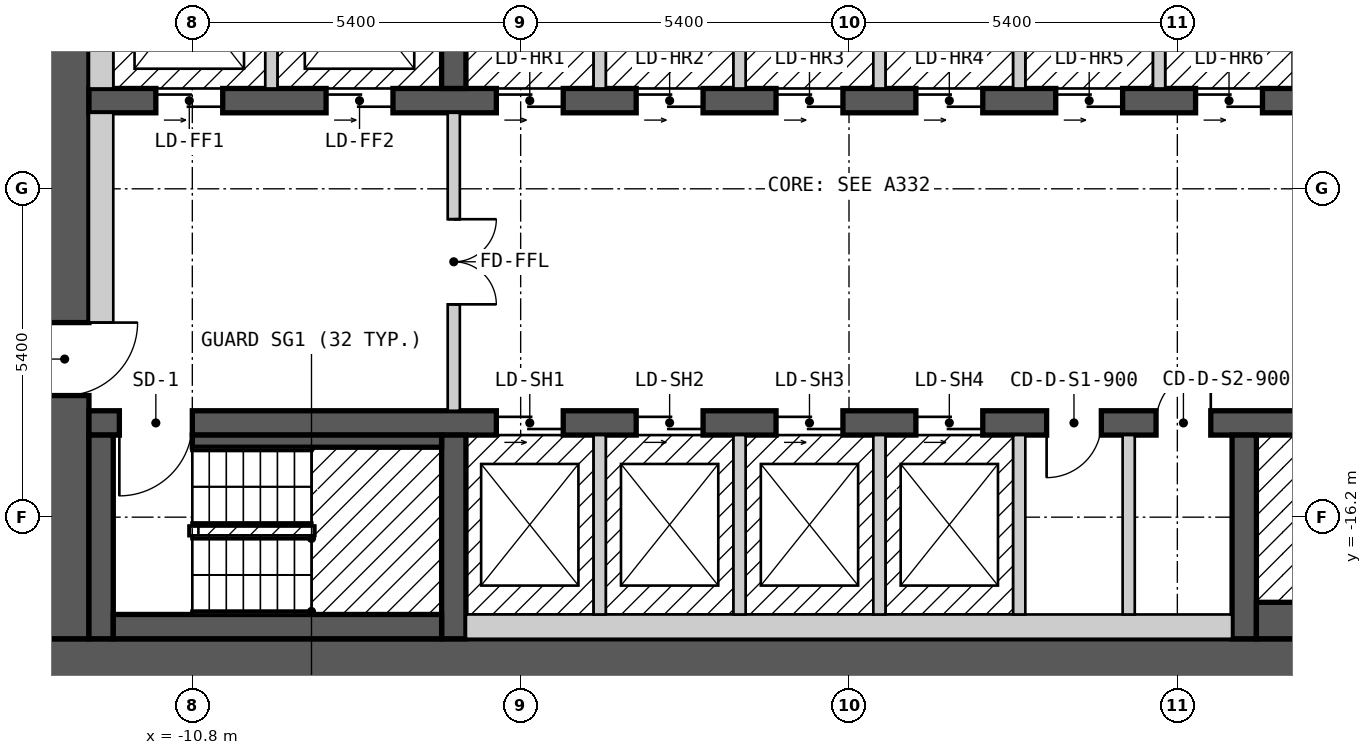
"""IFC4 building model, lengths in metres.
Left out: names, types, materials, properties, quantities, classifications, styles, units other than length and angle.
Written with IfcOpenShell. Run it as: python <this file> out.ifc"""

import sys

from ifc_helpers import new_model, si_unit, direction, frame, frame_2d, origin, place, context, subcontext, project, spatial, rectangle, extrude, element, fill, save


model = new_model("IFC4")
c1 = context("Model", 3, precision=1e-05, world=origin(), true_north=direction((0.0, 1.0)))
c2 = subcontext(c1, "Body", "Model", "MODEL_VIEW")
j1 = project(units=[si_unit("LENGTHUNIT", "METRE"), si_unit("PLANEANGLEUNIT", "RADIAN")], contexts=[c1])
p1 = place(None, origin())
s1 = spatial("IfcSite", under=j1, at=p1, CompositionType="ELEMENT")
p2 = place(p1, origin())
s2 = spatial("IfcBuilding", under=s1, at=p2, CompositionType="ELEMENT")
p3 = place(p2, frame((0.0, 0.0, 111.6)))
s3 = spatial("IfcBuildingStorey", under=s2, at=p3, CompositionType="ELEMENT", Elevation=111.6)
p4 = place(p3, frame((-13.3, -18.6, 0.0), z_axis=(0.0, 0.0, 1.0), x_axis=(1.0, 0.0, 0.0)))
e1 = element("IfcWall", 1, at=p4, inside=s3, PredefinedType="SHEAR", context=c2, shape_type="SweptSolid", body=[
    extrude(rectangle(XDim=26.6, YDim=0.8, at=frame_2d((13.3, 0.0))), origin(), (0.0, 0.0, 1.0), 5.7),
])
p5 = place(p3, frame((-12.9, -18.2, 0.0), z_axis=(0.0, 0.0, 1.0), x_axis=(0.0, 1.0, 0.0)))
e2 = element("IfcWall", 2, at=p5, inside=s3, PredefinedType="SHEAR", context=c2, shape_type="SweptSolid", body=[
    extrude(rectangle(XDim=12.4, YDim=0.8, at=frame_2d((6.2, 0.0))), origin(), (0.0, 0.0, 1.0), 5.7),
])
p6 = place(p5, frame((4.0, 0.0, 0.0)))
e3 = element("IfcOpeningElement", 3, at=p6, cuts=e2, PredefinedType="OPENING", context=c2, shape_type="SweptSolid", body=[
    extrude(rectangle(XDim=1.2, YDim=2.1, at=frame_2d((0.6, 1.05))), frame((0.0, 0.41, 0.0), z_axis=(0.0, -1.0, 0.0), x_axis=(1.0, 0.0, 0.0)), (0.0, 0.0, 1.0), 0.82),
])
p7 = place(p3, frame((-12.5, -14.65, 0.0), z_axis=(0.0, 0.0, 1.0), x_axis=(1.0, 0.0, 0.0)))
e4 = element("IfcWall", 4, at=p7, inside=s3, PredefinedType="SHEAR", context=c2, shape_type="SweptSolid", body=[
    extrude(rectangle(XDim=25.0, YDim=0.4, at=frame_2d((12.5, 0.0))), origin(), (0.0, 0.0, 1.0), 5.7),
])
p8 = place(p7, frame((6.7, 0.0, 0.0)))
e5 = element("IfcOpeningElement", 5, at=p8, cuts=e4, PredefinedType="OPENING", context=c2, shape_type="SweptSolid", body=[
    extrude(rectangle(XDim=1.1, YDim=2.1, at=frame_2d((0.55, 1.05))), frame((0.0, 0.21, 0.0), z_axis=(0.0, -1.0, 0.0), x_axis=(1.0, 0.0, 0.0)), (0.0, 0.0, 1.0), 0.42),
])
p9 = place(p7, frame((9.0, 0.0, 0.0)))
e6 = element("IfcOpeningElement", 6, at=p9, cuts=e4, PredefinedType="OPENING", context=c2, shape_type="SweptSolid", body=[
    extrude(rectangle(XDim=1.1, YDim=2.1, at=frame_2d((0.55, 1.05))), frame((0.0, 0.21, 0.0), z_axis=(0.0, -1.0, 0.0), x_axis=(1.0, 0.0, 0.0)), (0.0, 0.0, 1.0), 0.42),
])
p10 = place(p7, frame((11.3, 0.0, 0.0)))
e7 = element("IfcOpeningElement", 7, at=p10, cuts=e4, PredefinedType="OPENING", context=c2, shape_type="SweptSolid", body=[
    extrude(rectangle(XDim=1.1, YDim=2.1, at=frame_2d((0.55, 1.05))), frame((0.0, 0.21, 0.0), z_axis=(0.0, -1.0, 0.0), x_axis=(1.0, 0.0, 0.0)), (0.0, 0.0, 1.0), 0.42),
])
p11 = place(p7, frame((13.6, 0.0, 0.0)))
e8 = element("IfcOpeningElement", 8, at=p11, cuts=e4, PredefinedType="OPENING", context=c2, shape_type="SweptSolid", body=[
    extrude(rectangle(XDim=1.1, YDim=2.1, at=frame_2d((0.55, 1.05))), frame((0.0, 0.21, 0.0), z_axis=(0.0, -1.0, 0.0), x_axis=(1.0, 0.0, 0.0)), (0.0, 0.0, 1.0), 0.42),
])
p12 = place(p7, frame((1.7, 0.0, 0.0), z_axis=(0.0, 0.0, 1.0), x_axis=(-1.0, 0.0, 0.0)))
e9 = element("IfcOpeningElement", 9, at=p12, cuts=e4, PredefinedType="OPENING", context=c2, shape_type="SweptSolid", body=[
    extrude(rectangle(XDim=1.2, YDim=2.1, at=frame_2d((0.6, 1.05))), frame((0.0, 0.21, 0.0), z_axis=(0.0, -1.0, 0.0), x_axis=(1.0, 0.0, 0.0)), (0.0, 0.0, 1.0), 0.42),
])
p13 = place(p7, frame((24.55, 0.0, 0.0), z_axis=(0.0, 0.0, 1.0), x_axis=(-1.0, 0.0, 0.0)))
e10 = element("IfcOpeningElement", 10, at=p13, cuts=e4, PredefinedType="OPENING", context=c2, shape_type="SweptSolid", body=[
    extrude(rectangle(XDim=1.2, YDim=2.1, at=frame_2d((0.6, 1.05))), frame((0.0, 0.21, 0.0), z_axis=(0.0, -1.0, 0.0), x_axis=(1.0, 0.0, 0.0)), (0.0, 0.0, 1.0), 0.42),
])
p14 = place(p7, frame((16.65, 0.0, 0.0), z_axis=(0.0, 0.0, 1.0), x_axis=(-1.0, 0.0, 0.0)))
e11 = element("IfcOpeningElement", 11, at=p14, cuts=e4, PredefinedType="OPENING", context=c2, shape_type="SweptSolid", body=[
    extrude(rectangle(XDim=0.9, YDim=2.1, at=frame_2d((0.45, 1.05))), frame((0.0, 0.21, 0.0), z_axis=(0.0, -1.0, 0.0), x_axis=(1.0, 0.0, 0.0)), (0.0, 0.0, 1.0), 0.42),
])
p15 = place(p7, frame((18.45, 0.0, 0.0), z_axis=(0.0, 0.0, 1.0), x_axis=(-1.0, 0.0, 0.0)))
e12 = element("IfcOpeningElement", 12, at=p15, cuts=e4, PredefinedType="OPENING", context=c2, shape_type="SweptSolid", body=[
    extrude(rectangle(XDim=0.9, YDim=2.1, at=frame_2d((0.45, 1.05))), frame((0.0, 0.21, 0.0), z_axis=(0.0, -1.0, 0.0), x_axis=(1.0, 0.0, 0.0)), (0.0, 0.0, 1.0), 0.42),
])
p16 = place(p3, frame((-12.5, -9.35, 0.0), z_axis=(0.0, 0.0, 1.0), x_axis=(1.0, 0.0, 0.0)))
e13 = element("IfcWall", 13, at=p16, inside=s3, PredefinedType="SHEAR", context=c2, shape_type="SweptSolid", body=[
    extrude(rectangle(XDim=22.7, YDim=0.4, at=frame_2d((11.35, 0.0))), origin(), (0.0, 0.0, 1.0), 5.7),
])
p17 = place(p16, frame((1.1, 0.0, 0.0)))
e14 = element("IfcOpeningElement", 14, at=p17, cuts=e13, PredefinedType="OPENING", context=c2, shape_type="SweptSolid", body=[
    extrude(rectangle(XDim=1.1, YDim=2.1, at=frame_2d((0.55, 1.05))), frame((0.0, 0.21, 0.0), z_axis=(0.0, -1.0, 0.0), x_axis=(1.0, 0.0, 0.0)), (0.0, 0.0, 1.0), 0.42),
])
p18 = place(p16, frame((3.9, 0.0, 0.0)))
e15 = element("IfcOpeningElement", 15, at=p18, cuts=e13, PredefinedType="OPENING", context=c2, shape_type="SweptSolid", body=[
    extrude(rectangle(XDim=1.1, YDim=2.1, at=frame_2d((0.55, 1.05))), frame((0.0, 0.21, 0.0), z_axis=(0.0, -1.0, 0.0), x_axis=(1.0, 0.0, 0.0)), (0.0, 0.0, 1.0), 0.42),
])
p19 = place(p16, frame((6.7, 0.0, 0.0)))
e16 = element("IfcOpeningElement", 16, at=p19, cuts=e13, PredefinedType="OPENING", context=c2, shape_type="SweptSolid", body=[
    extrude(rectangle(XDim=1.1, YDim=2.1, at=frame_2d((0.55, 1.05))), frame((0.0, 0.21, 0.0), z_axis=(0.0, -1.0, 0.0), x_axis=(1.0, 0.0, 0.0)), (0.0, 0.0, 1.0), 0.42),
])
p20 = place(p16, frame((9.0, 0.0, 0.0)))
e17 = element("IfcOpeningElement", 17, at=p20, cuts=e13, PredefinedType="OPENING", context=c2, shape_type="SweptSolid", body=[
    extrude(rectangle(XDim=1.1, YDim=2.1, at=frame_2d((0.55, 1.05))), frame((0.0, 0.21, 0.0), z_axis=(0.0, -1.0, 0.0), x_axis=(1.0, 0.0, 0.0)), (0.0, 0.0, 1.0), 0.42),
])
p21 = place(p16, frame((11.3, 0.0, 0.0)))
e18 = element("IfcOpeningElement", 18, at=p21, cuts=e13, PredefinedType="OPENING", context=c2, shape_type="SweptSolid", body=[
    extrude(rectangle(XDim=1.1, YDim=2.1, at=frame_2d((0.55, 1.05))), frame((0.0, 0.21, 0.0), z_axis=(0.0, -1.0, 0.0), x_axis=(1.0, 0.0, 0.0)), (0.0, 0.0, 1.0), 0.42),
])
p22 = place(p16, frame((13.6, 0.0, 0.0)))
e19 = element("IfcOpeningElement", 19, at=p22, cuts=e13, PredefinedType="OPENING", context=c2, shape_type="SweptSolid", body=[
    extrude(rectangle(XDim=1.1, YDim=2.1, at=frame_2d((0.55, 1.05))), frame((0.0, 0.21, 0.0), z_axis=(0.0, -1.0, 0.0), x_axis=(1.0, 0.0, 0.0)), (0.0, 0.0, 1.0), 0.42),
])
p23 = place(p16, frame((15.9, 0.0, 0.0)))
e20 = element("IfcOpeningElement", 20, at=p23, cuts=e13, PredefinedType="OPENING", context=c2, shape_type="SweptSolid", body=[
    extrude(rectangle(XDim=1.1, YDim=2.1, at=frame_2d((0.55, 1.05))), frame((0.0, 0.21, 0.0), z_axis=(0.0, -1.0, 0.0), x_axis=(1.0, 0.0, 0.0)), (0.0, 0.0, 1.0), 0.42),
])
p24 = place(p16, frame((18.2, 0.0, 0.0)))
e21 = element("IfcOpeningElement", 21, at=p24, cuts=e13, PredefinedType="OPENING", context=c2, shape_type="SweptSolid", body=[
    extrude(rectangle(XDim=1.1, YDim=2.1, at=frame_2d((0.55, 1.05))), frame((0.0, 0.21, 0.0), z_axis=(0.0, -1.0, 0.0), x_axis=(1.0, 0.0, 0.0)), (0.0, 0.0, 1.0), 0.42),
])
p25 = place(p16, frame((20.6, 0.0, 0.0)))
e22 = element("IfcOpeningElement", 22, at=p25, cuts=e13, PredefinedType="OPENING", context=c2, shape_type="SweptSolid", body=[
    extrude(rectangle(XDim=1.1, YDim=2.1, at=frame_2d((0.55, 1.05))), frame((0.0, 0.21, 0.0), z_axis=(0.0, -1.0, 0.0), x_axis=(1.0, 0.0, 0.0)), (0.0, 0.0, 1.0), 0.42),
])
for number, where, z_axis, x_axis in (
    (23, (-6.5, -18.2, 0.0), (0.0, 0.0, 1.0), (0.0, 1.0, 0.0)),
    (24, (6.5, -18.2, 0.0), (0.0, 0.0, 1.0), (0.0, 1.0, 0.0)),
    (25, (-6.5, -9.15, 0.0), (0.0, 0.0, 1.0), (0.0, 1.0, 0.0)),
):
    element("IfcWall", number, at=place(p3, frame(where, z_axis=z_axis, x_axis=x_axis)), inside=s3, PredefinedType="SHEAR", context=c2, shape_type="SweptSolid", body=[
        extrude(rectangle(XDim=3.35, YDim=0.4, at=frame_2d((1.675, 0.0))), origin(), (0.0, 0.0, 1.0), 5.7),
    ])
p26 = place(p3, frame((-12.3, -18.2, 0.0), z_axis=(0.0, 0.0, 1.0), x_axis=(0.0, 1.0, 0.0)))
e26 = element("IfcWall", 26, at=p26, inside=s3, PredefinedType="SOLIDWALL", context=c2, shape_type="SweptSolid", body=[
    extrude(rectangle(XDim=3.35, YDim=0.4, at=frame_2d((1.675, 0.0))), origin(), (0.0, 0.0, 1.0), 5.7),
])
p27 = place(p3, frame((-12.3, -13.0, 0.0), z_axis=(0.0, 0.0, 1.0), x_axis=(0.0, 1.0, 0.0)))
e27 = element("IfcWall", 27, at=p27, inside=s3, PredefinedType="PARTITIONING", context=c2, shape_type="SweptSolid", body=[
    extrude(rectangle(XDim=3.45, YDim=0.4, at=frame_2d((1.725, 0.0))), origin(), (0.0, 0.0, 1.0), 5.7),
])
p28 = place(p3, frame((-12.3, -9.15, 0.0), z_axis=(0.0, 0.0, 1.0), x_axis=(0.0, 1.0, 0.0)))
e28 = element("IfcWall", 28, at=p28, inside=s3, PredefinedType="SOLIDWALL", context=c2, shape_type="SweptSolid", body=[
    extrude(rectangle(XDim=3.35, YDim=0.4, at=frame_2d((1.675, 0.0))), origin(), (0.0, 0.0, 1.0), 5.7),
])
p29 = place(p3, frame((-12.1, -18.0, 0.0), z_axis=(0.0, 0.0, 1.0), x_axis=(1.0, 0.0, 0.0)))
e29 = element("IfcWall", 29, at=p29, inside=s3, PredefinedType="SOLIDWALL", context=c2, shape_type="SweptSolid", body=[
    extrude(rectangle(XDim=5.4, YDim=0.4, at=frame_2d((2.7, 0.0))), origin(), (0.0, 0.0, 1.0), 5.7),
])
p30 = place(p3, frame((-10.8, -14.95, 0.0), z_axis=(0.0, 0.0, 1.0), x_axis=(1.0, 0.0, 0.0)))
e30 = element("IfcWall", 30, at=p30, inside=s3, PredefinedType="SOLIDWALL", context=c2, shape_type="SweptSolid", body=[
    extrude(rectangle(XDim=4.1, YDim=0.2, at=frame_2d((2.05, 0.0))), origin(), (0.0, 0.0, 1.0), 5.7),
])
p31 = place(p3, frame((-9.5, -9.15, 0.0), z_axis=(0.0, 0.0, 1.0), x_axis=(0.0, 1.0, 0.0)))
e31 = element("IfcWall", 31, at=p31, inside=s3, PredefinedType="SOLIDWALL", context=c2, shape_type="SweptSolid", body=[
    extrude(rectangle(XDim=2.95, YDim=0.2, at=frame_2d((1.475, 0.0))), origin(), (0.0, 0.0, 1.0), 5.7),
])
p32 = place(p3, frame((-6.5, -14.45, 0.0), z_axis=(0.0, 0.0, 1.0), x_axis=(0.0, 1.0, 0.0)))
e32 = element("IfcWall", 32, at=p32, inside=s3, PredefinedType="PARTITIONING", context=c2, shape_type="SweptSolid", body=[
    extrude(rectangle(XDim=4.9, YDim=0.2, at=frame_2d((2.45, 0.0))), origin(), (0.0, 0.0, 1.0), 5.7),
])
p33 = place(p32, frame((3.15, 0.0, 0.0), z_axis=(0.0, 0.0, 1.0), x_axis=(-1.0, 0.0, 0.0)))
e33 = element("IfcOpeningElement", 33, at=p33, cuts=e32, PredefinedType="OPENING", context=c2, shape_type="SweptSolid", body=[
    extrude(rectangle(XDim=1.4, YDim=2.1, at=frame_2d((0.7, 1.05))), frame((0.0, 0.11, 0.0), z_axis=(0.0, -1.0, 0.0), x_axis=(1.0, 0.0, 0.0)), (0.0, 0.0, 1.0), 0.22),
])
p34 = place(p3, frame((-6.3, -18.0, 0.0), z_axis=(0.0, 0.0, 1.0), x_axis=(1.0, 0.0, 0.0)))
e34 = element("IfcWall", 34, at=p34, inside=s3, PredefinedType="SOLIDWALL", context=c2, shape_type="SweptSolid", body=[
    extrude(rectangle(XDim=12.6, YDim=0.4, at=frame_2d((6.3, 0.0))), origin(), (0.0, 0.0, 1.0), 5.7),
])
for number, where, z_axis, x_axis in (
    (35, (-4.1, -17.8, 0.0), (0.0, 0.0, 1.0), (0.0, 1.0, 0.0)),
    (36, (-4.1, -9.15, 0.0), (0.0, 0.0, 1.0), (0.0, 1.0, 0.0)),
    (37, (-1.8, -17.8, 0.0), (0.0, 0.0, 1.0), (0.0, 1.0, 0.0)),
    (38, (-1.8, -9.15, 0.0), (0.0, 0.0, 1.0), (0.0, 1.0, 0.0)),
    (39, (0.5, -17.8, 0.0), (0.0, 0.0, 1.0), (0.0, 1.0, 0.0)),
    (40, (0.5, -9.15, 0.0), (0.0, 0.0, 1.0), (0.0, 1.0, 0.0)),
    (41, (2.8, -17.8, 0.0), (0.0, 0.0, 1.0), (0.0, 1.0, 0.0)),
    (42, (2.8, -9.15, 0.0), (0.0, 0.0, 1.0), (0.0, 1.0, 0.0)),
):
    element("IfcWall", number, at=place(p3, frame(where, z_axis=z_axis, x_axis=x_axis)), inside=s3, PredefinedType="SOLIDWALL", context=c2, shape_type="SweptSolid", body=[
        extrude(rectangle(XDim=2.95, YDim=0.2, at=frame_2d((1.475, 0.0))), origin(), (0.0, 0.0, 1.0), 5.7),
    ])
p35 = place(p3, frame((4.6, -17.8, 0.0), z_axis=(0.0, 0.0, 1.0), x_axis=(0.0, 1.0, 0.0)))
e43 = element("IfcWall", 43, at=p35, inside=s3, PredefinedType="PARTITIONING", context=c2, shape_type="SweptSolid", body=[
    extrude(rectangle(XDim=2.95, YDim=0.2, at=frame_2d((1.475, 0.0))), origin(), (0.0, 0.0, 1.0), 5.7),
])
p36 = place(p3, frame((5.1, -9.15, 0.0), z_axis=(0.0, 0.0, 1.0), x_axis=(0.0, 1.0, 0.0)))
e44 = element("IfcWall", 44, at=p36, inside=s3, PredefinedType="SOLIDWALL", context=c2, shape_type="SweptSolid", body=[
    extrude(rectangle(XDim=2.95, YDim=0.2, at=frame_2d((1.475, 0.0))), origin(), (0.0, 0.0, 1.0), 5.7),
])
p37 = place(p3, frame((6.7, -17.9, 0.0), z_axis=(0.0, 0.0, 1.0), x_axis=(1.0, 0.0, 0.0)))
e45 = element("IfcWall", 45, at=p37, inside=s3, PredefinedType="SOLIDWALL", context=c2, shape_type="SweptSolid", body=[
    extrude(rectangle(XDim=5.8, YDim=0.6, at=frame_2d((2.9, 0.0))), origin(), (0.0, 0.0, 1.0), 5.7),
])
p38 = place(p3, frame((7.4, -9.15, 0.0), z_axis=(0.0, 0.0, 1.0), x_axis=(0.0, 1.0, 0.0)))
e46 = element("IfcWall", 46, at=p38, inside=s3, PredefinedType="SOLIDWALL", context=c2, shape_type="SweptSolid", body=[
    extrude(rectangle(XDim=2.95, YDim=0.2, at=frame_2d((1.475, 0.0))), origin(), (0.0, 0.0, 1.0), 5.7),
])
p39 = place(p17, origin())
e47 = element("IfcDoor", 47, at=p39, inside=s3, OperationType="DOUBLE_DOOR_SLIDING", PredefinedType="DOOR", context=c2, shape_type="SweptSolid", body=[
    extrude(rectangle(XDim=1.1, YDim=2.1, at=frame_2d((0.55, 1.05))), frame((0.0, 0.025, 0.0), z_axis=(0.0, -1.0, 0.0), x_axis=(1.0, 0.0, 0.0)), (0.0, 0.0, 1.0), 0.05),
])
fill(e14, e47)
p40 = place(p18, origin())
e48 = element("IfcDoor", 48, at=p40, inside=s3, OperationType="DOUBLE_DOOR_SLIDING", PredefinedType="DOOR", context=c2, shape_type="SweptSolid", body=[
    extrude(rectangle(XDim=1.1, YDim=2.1, at=frame_2d((0.55, 1.05))), frame((0.0, 0.025, 0.0), z_axis=(0.0, -1.0, 0.0), x_axis=(1.0, 0.0, 0.0)), (0.0, 0.0, 1.0), 0.05),
])
fill(e15, e48)
p41 = place(p19, origin())
e49 = element("IfcDoor", 49, at=p41, inside=s3, OperationType="DOUBLE_DOOR_SLIDING", PredefinedType="DOOR", context=c2, shape_type="SweptSolid", body=[
    extrude(rectangle(XDim=1.1, YDim=2.1, at=frame_2d((0.55, 1.05))), frame((0.0, 0.025, 0.0), z_axis=(0.0, -1.0, 0.0), x_axis=(1.0, 0.0, 0.0)), (0.0, 0.0, 1.0), 0.05),
])
fill(e16, e49)
p42 = place(p20, origin())
e50 = element("IfcDoor", 50, at=p42, inside=s3, OperationType="DOUBLE_DOOR_SLIDING", PredefinedType="DOOR", context=c2, shape_type="SweptSolid", body=[
    extrude(rectangle(XDim=1.1, YDim=2.1, at=frame_2d((0.55, 1.05))), frame((0.0, 0.025, 0.0), z_axis=(0.0, -1.0, 0.0), x_axis=(1.0, 0.0, 0.0)), (0.0, 0.0, 1.0), 0.05),
])
fill(e17, e50)
p43 = place(p21, origin())
e51 = element("IfcDoor", 51, at=p43, inside=s3, OperationType="DOUBLE_DOOR_SLIDING", PredefinedType="DOOR", context=c2, shape_type="SweptSolid", body=[
    extrude(rectangle(XDim=1.1, YDim=2.1, at=frame_2d((0.55, 1.05))), frame((0.0, 0.025, 0.0), z_axis=(0.0, -1.0, 0.0), x_axis=(1.0, 0.0, 0.0)), (0.0, 0.0, 1.0), 0.05),
])
fill(e18, e51)
p44 = place(p22, origin())
e52 = element("IfcDoor", 52, at=p44, inside=s3, OperationType="DOUBLE_DOOR_SLIDING", PredefinedType="DOOR", context=c2, shape_type="SweptSolid", body=[
    extrude(rectangle(XDim=1.1, YDim=2.1, at=frame_2d((0.55, 1.05))), frame((0.0, 0.025, 0.0), z_axis=(0.0, -1.0, 0.0), x_axis=(1.0, 0.0, 0.0)), (0.0, 0.0, 1.0), 0.05),
])
fill(e19, e52)
p45 = place(p23, origin())
e53 = element("IfcDoor", 53, at=p45, inside=s3, OperationType="DOUBLE_DOOR_SLIDING", PredefinedType="DOOR", context=c2, shape_type="SweptSolid", body=[
    extrude(rectangle(XDim=1.1, YDim=2.1, at=frame_2d((0.55, 1.05))), frame((0.0, 0.025, 0.0), z_axis=(0.0, -1.0, 0.0), x_axis=(1.0, 0.0, 0.0)), (0.0, 0.0, 1.0), 0.05),
])
fill(e20, e53)
p46 = place(p24, origin())
e54 = element("IfcDoor", 54, at=p46, inside=s3, OperationType="DOUBLE_DOOR_SLIDING", PredefinedType="DOOR", context=c2, shape_type="SweptSolid", body=[
    extrude(rectangle(XDim=1.1, YDim=2.1, at=frame_2d((0.55, 1.05))), frame((0.0, 0.025, 0.0), z_axis=(0.0, -1.0, 0.0), x_axis=(1.0, 0.0, 0.0)), (0.0, 0.0, 1.0), 0.05),
])
fill(e21, e54)
p47 = place(p8, origin())
e55 = element("IfcDoor", 55, at=p47, inside=s3, OperationType="DOUBLE_DOOR_SLIDING", PredefinedType="DOOR", context=c2, shape_type="SweptSolid", body=[
    extrude(rectangle(XDim=1.1, YDim=2.1, at=frame_2d((0.55, 1.05))), frame((0.0, 0.025, 0.0), z_axis=(0.0, -1.0, 0.0), x_axis=(1.0, 0.0, 0.0)), (0.0, 0.0, 1.0), 0.05),
])
fill(e5, e55)
p48 = place(p9, origin())
e56 = element("IfcDoor", 56, at=p48, inside=s3, OperationType="DOUBLE_DOOR_SLIDING", PredefinedType="DOOR", context=c2, shape_type="SweptSolid", body=[
    extrude(rectangle(XDim=1.1, YDim=2.1, at=frame_2d((0.55, 1.05))), frame((0.0, 0.025, 0.0), z_axis=(0.0, -1.0, 0.0), x_axis=(1.0, 0.0, 0.0)), (0.0, 0.0, 1.0), 0.05),
])
fill(e6, e56)
p49 = place(p10, origin())
e57 = element("IfcDoor", 57, at=p49, inside=s3, OperationType="DOUBLE_DOOR_SLIDING", PredefinedType="DOOR", context=c2, shape_type="SweptSolid", body=[
    extrude(rectangle(XDim=1.1, YDim=2.1, at=frame_2d((0.55, 1.05))), frame((0.0, 0.025, 0.0), z_axis=(0.0, -1.0, 0.0), x_axis=(1.0, 0.0, 0.0)), (0.0, 0.0, 1.0), 0.05),
])
fill(e7, e57)
p50 = place(p11, origin())
e58 = element("IfcDoor", 58, at=p50, inside=s3, OperationType="DOUBLE_DOOR_SLIDING", PredefinedType="DOOR", context=c2, shape_type="SweptSolid", body=[
    extrude(rectangle(XDim=1.1, YDim=2.1, at=frame_2d((0.55, 1.05))), frame((0.0, 0.025, 0.0), z_axis=(0.0, -1.0, 0.0), x_axis=(1.0, 0.0, 0.0)), (0.0, 0.0, 1.0), 0.05),
])
fill(e8, e58)
p51 = place(p12, origin())
e59 = element("IfcDoor", 59, at=p51, inside=s3, OperationType="SINGLE_SWING_RIGHT", PredefinedType="DOOR", context=c2, shape_type="SweptSolid", body=[
    extrude(rectangle(XDim=1.2, YDim=2.1, at=frame_2d((0.6, 1.05))), frame((0.0, 0.025, 0.0), z_axis=(0.0, -1.0, 0.0), x_axis=(1.0, 0.0, 0.0)), (0.0, 0.0, 1.0), 0.05),
])
fill(e9, e59)
p52 = place(p6, origin())
e60 = element("IfcDoor", 60, at=p52, inside=s3, OperationType="SINGLE_SWING_RIGHT", PredefinedType="DOOR", context=c2, shape_type="SweptSolid", body=[
    extrude(rectangle(XDim=1.2, YDim=2.1, at=frame_2d((0.6, 1.05))), frame((0.0, 0.025, 0.0), z_axis=(0.0, -1.0, 0.0), x_axis=(1.0, 0.0, 0.0)), (0.0, 0.0, 1.0), 0.05),
])
fill(e3, e60)
p53 = place(p33, origin())
e61 = element("IfcDoor", 61, at=p53, inside=s3, OperationType="DOUBLE_DOOR_SINGLE_SWING", PredefinedType="DOOR", context=c2, shape_type="SweptSolid", body=[
    extrude(rectangle(XDim=1.4, YDim=2.1, at=frame_2d((0.7, 1.05))), frame((0.0, 0.025, 0.0), z_axis=(0.0, -1.0, 0.0), x_axis=(1.0, 0.0, 0.0)), (0.0, 0.0, 1.0), 0.05),
])
fill(e33, e61)
p54 = place(p14, origin())
e62 = element("IfcDoor", 62, at=p54, inside=s3, OperationType="SINGLE_SWING_RIGHT", PredefinedType="DOOR", context=c2, shape_type="SweptSolid", body=[
    extrude(rectangle(XDim=0.9, YDim=2.1, at=frame_2d((0.45, 1.05))), frame((0.0, 0.025, 0.0), z_axis=(0.0, -1.0, 0.0), x_axis=(1.0, 0.0, 0.0)), (0.0, 0.0, 1.0), 0.05),
])
fill(e11, e62)
p55 = place(p15, origin())
e63 = element("IfcDoor", 63, at=p55, inside=s3, OperationType="SINGLE_SWING_LEFT", PredefinedType="DOOR", context=c2, shape_type="SweptSolid", body=[
    extrude(rectangle(XDim=0.9, YDim=2.1, at=frame_2d((0.45, 1.05))), frame((0.0, 0.025, 0.0), z_axis=(0.0, -1.0, 0.0), x_axis=(1.0, 0.0, 0.0)), (0.0, 0.0, 1.0), 0.05),
])
fill(e12, e63)
save(model, sys.argv[1])
